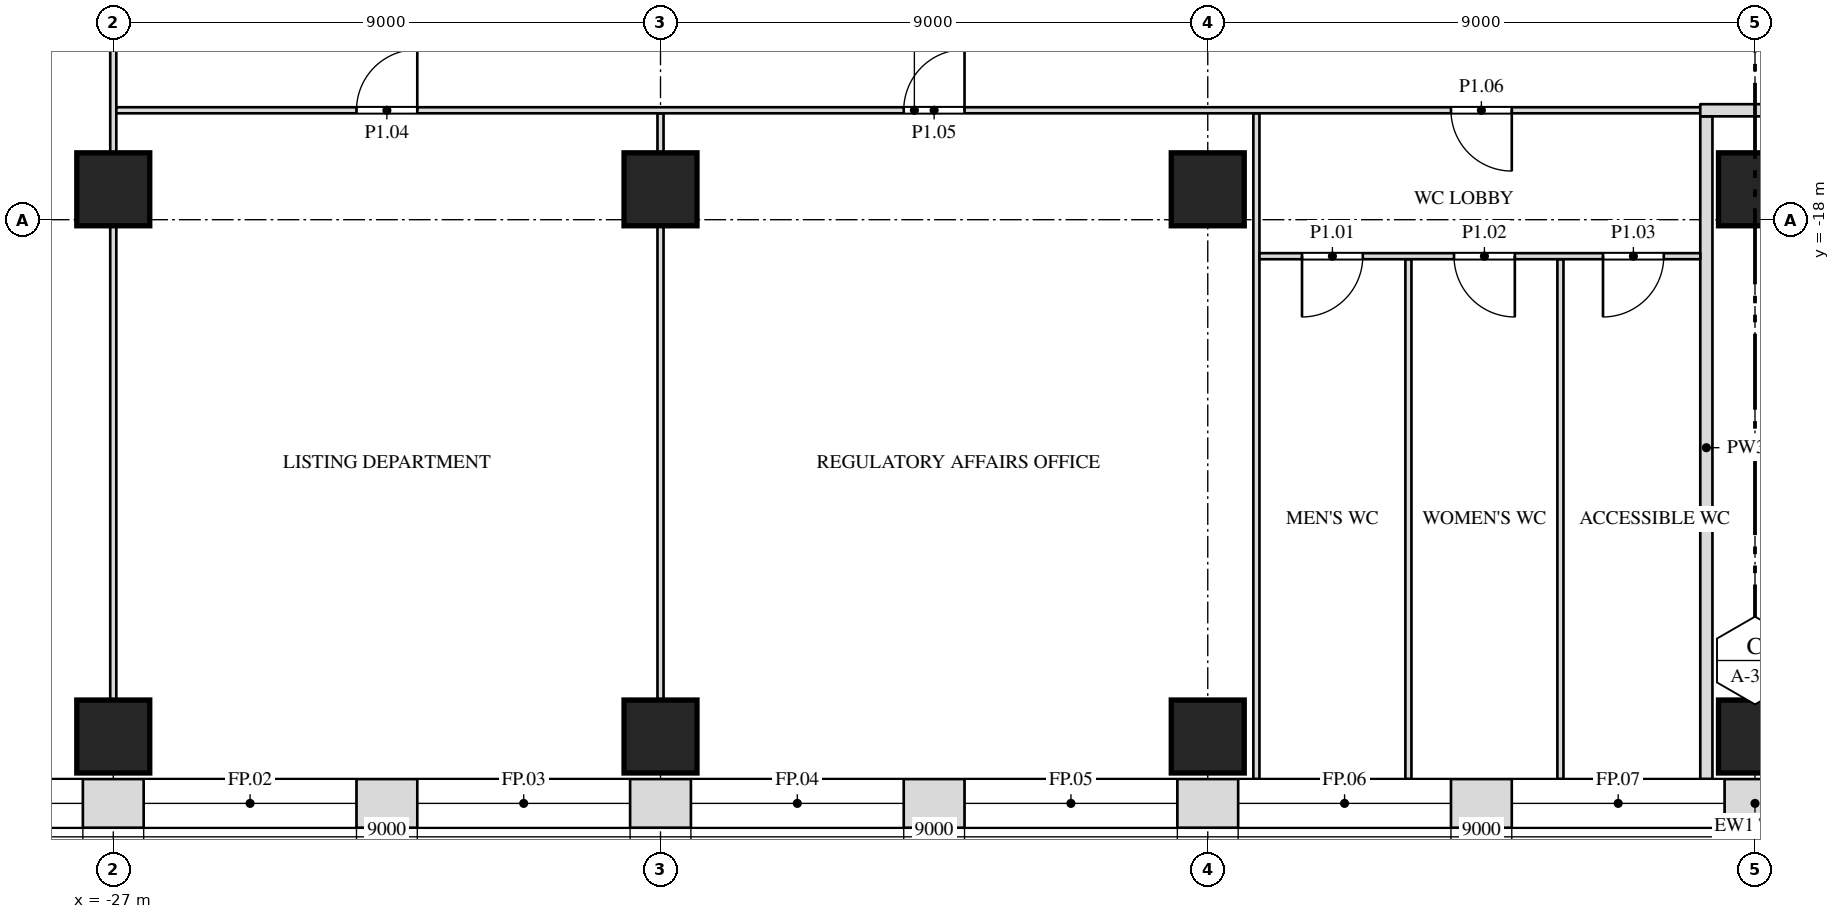
"""IFC4 building model, lengths in metres.
Left out: names, types, materials, properties, quantities, classifications, styles, units other than length and angle.
Written with IfcOpenShell. Run it as: python <this file> out.ifc"""

import sys

from ifc_helpers import new_model, si_unit, direction, frame, frame_2d, origin, origin_2d, place, context, subcontext, project, spatial, rectangle, extrude, element, fill, save


model = new_model("IFC4")
c1 = context("Model", 3, precision=1e-05, world=origin(), true_north=direction((0.0, 1.0)))
c2 = subcontext(c1, "Body", "Model", "MODEL_VIEW")
j1 = project(units=[si_unit("LENGTHUNIT", "METRE"), si_unit("PLANEANGLEUNIT", "RADIAN")], contexts=[c1])
p1 = place(None, origin())
s1 = spatial("IfcSite", under=j1, at=p1, CompositionType="ELEMENT")
p2 = place(p1, origin())
s2 = spatial("IfcBuilding", under=s1, at=p2, CompositionType="ELEMENT")
p3 = place(p2, frame((0.0, 0.0, 9.0)))
s3 = spatial("IfcBuildingStorey", under=s2, at=p3, CompositionType="ELEMENT", Elevation=9.0)
for number, where, z_axis, x_axis in (
    (1, (-27.0, -26.5, 0.0), (0.0, 0.0, 1.0), (1.0, 0.0, 0.0)),
    (2, (-18.0, -26.5, 0.0), (0.0, 0.0, 1.0), (1.0, 0.0, 0.0)),
    (3, (-9.0, -26.5, 0.0), (0.0, 0.0, 1.0), (1.0, 0.0, 0.0)),
    (4, (0.0, -26.5, 0.0), (0.0, 0.0, 1.0), (1.0, 0.0, 0.0)),
    (5, (-27.0, -17.5, 0.0), (0.0, 0.0, 1.0), (1.0, 0.0, 0.0)),
    (6, (-18.0, -17.5, 0.0), (0.0, 0.0, 1.0), (1.0, 0.0, 0.0)),
    (7, (-9.0, -17.5, 0.0), (0.0, 0.0, 1.0), (1.0, 0.0, 0.0)),
    (8, (0.0, -17.5, 0.0), (0.0, 0.0, 1.0), (1.0, 0.0, 0.0)),
):
    element("IfcColumn", number, at=place(p3, frame(where, z_axis=z_axis, x_axis=x_axis)), inside=s3, PredefinedType="COLUMN", context=c2, shape_type="SweptSolid", body=[
        extrude(rectangle(XDim=1.2, YDim=1.2, at=origin_2d()), origin(), (0.0, 0.0, 1.0), 6.0),
    ])
p4 = place(p3, frame((-27.0, -25.9, 0.0), z_axis=(0.0, 0.0, 1.0), x_axis=(0.0, 1.0, 0.0)))
e9 = element("IfcWall", 9, at=p4, inside=s3, PredefinedType="PARTITIONING", context=c2, shape_type="SweptSolid", body=[
    extrude(rectangle(XDim=7.8, YDim=0.1, at=frame_2d((3.9, 0.0))), origin(), (0.0, 0.0, 1.0), 5.088),
])
p5 = place(p3, frame((-27.0, -16.9, 0.0), z_axis=(0.0, 0.0, 1.0), x_axis=(0.0, 1.0, 0.0)))
e10 = element("IfcWall", 10, at=p5, inside=s3, PredefinedType="PARTITIONING", context=c2, shape_type="SweptSolid", body=[
    extrude(rectangle(XDim=2.85, YDim=0.1, at=frame_2d((1.425, 0.0))), origin(), (0.0, 0.0, 1.0), 5.088),
])
p6 = place(p3, frame((-18.0, -25.9, 0.0), z_axis=(0.0, 0.0, 1.0), x_axis=(0.0, 1.0, 0.0)))
e11 = element("IfcWall", 11, at=p6, inside=s3, PredefinedType="PARTITIONING", context=c2, shape_type="SweptSolid", body=[
    extrude(rectangle(XDim=7.8, YDim=0.1, at=frame_2d((3.9, 0.0))), origin(), (0.0, 0.0, 1.0), 5.088),
])
p7 = place(p3, frame((-18.0, -16.9, 0.0), z_axis=(0.0, 0.0, 1.0), x_axis=(0.0, 1.0, 0.0)))
e12 = element("IfcWall", 12, at=p7, inside=s3, PredefinedType="PARTITIONING", context=c2, shape_type="SweptSolid", body=[
    extrude(rectangle(XDim=0.65, YDim=0.1, at=frame_2d((0.325, 0.0))), origin(), (0.0, 0.0, 1.0), 5.7),
])
p8 = place(p3, frame((-8.2, -27.2, 0.0), z_axis=(0.0, 0.0, 1.0), x_axis=(0.0, 1.0, 0.0)))
e13 = element("IfcWall", 13, at=p8, inside=s3, PredefinedType="PARTITIONING", context=c2, shape_type="SweptSolid", body=[
    extrude(rectangle(XDim=10.95, YDim=0.1, at=frame_2d((5.475, 0.0))), origin(), (0.0, 0.0, 1.0), 5.7),
])
for number, where, z_axis, x_axis in (
    (14, (-5.7, -27.2, 0.0), (0.0, 0.0, 1.0), (0.0, 1.0, 0.0)),
    (15, (-3.2, -27.2, 0.0), (0.0, 0.0, 1.0), (0.0, 1.0, 0.0)),
):
    element("IfcWall", number, at=place(p3, frame(where, z_axis=z_axis, x_axis=x_axis)), inside=s3, PredefinedType="PARTITIONING", context=c2, shape_type="SweptSolid", body=[
        extrude(rectangle(XDim=8.55, YDim=0.1, at=frame_2d((4.275, 0.0))), origin(), (0.0, 0.0, 1.0), 5.7),
    ])
p9 = place(p3, frame((-0.8, -27.2, 0.0), z_axis=(0.0, 0.0, 1.0), x_axis=(0.0, 1.0, 0.0)))
e16 = element("IfcWall", 16, at=p9, inside=s3, PredefinedType="PARTITIONING", context=c2, shape_type="SweptSolid", body=[
    extrude(rectangle(XDim=10.9, YDim=0.2, at=frame_2d((5.45, 0.0))), origin(), (0.0, 0.0, 1.0), 5.7),
])
p10 = place(p3, frame((-8.15, -18.6, 0.0), z_axis=(0.0, 0.0, 1.0), x_axis=(1.0, 0.0, 0.0)))
e17 = element("IfcWall", 17, at=p10, inside=s3, PredefinedType="PARTITIONING", context=c2, shape_type="SweptSolid", body=[
    extrude(rectangle(XDim=7.25, YDim=0.1, at=frame_2d((3.625, 0.0))), origin(), (0.0, 0.0, 1.0), 5.7),
])
p11 = place(p10, frame((0.7, 0.0, 0.0)))
e18 = element("IfcOpeningElement", 18, at=p11, cuts=e17, PredefinedType="OPENING", context=c2, shape_type="SweptSolid", body=[
    extrude(rectangle(XDim=1.0, YDim=2.1, at=frame_2d((0.5, 1.05))), frame((0.0, 0.062, 0.0), z_axis=(0.0, -1.0, 0.0), x_axis=(1.0, 0.0, 0.0)), (0.0, 0.0, 1.0), 0.124),
])
p12 = place(p10, frame((3.2, 0.0, 0.0)))
e19 = element("IfcOpeningElement", 19, at=p12, cuts=e17, PredefinedType="OPENING", context=c2, shape_type="SweptSolid", body=[
    extrude(rectangle(XDim=1.0, YDim=2.1, at=frame_2d((0.5, 1.05))), frame((0.0, 0.062, 0.0), z_axis=(0.0, -1.0, 0.0), x_axis=(1.0, 0.0, 0.0)), (0.0, 0.0, 1.0), 0.124),
])
p13 = place(p10, frame((5.65, 0.0, 0.0)))
e20 = element("IfcOpeningElement", 20, at=p13, cuts=e17, PredefinedType="OPENING", context=c2, shape_type="SweptSolid", body=[
    extrude(rectangle(XDim=1.0, YDim=2.1, at=frame_2d((0.5, 1.05))), frame((0.0, 0.062, 0.0), z_axis=(0.0, -1.0, 0.0), x_axis=(1.0, 0.0, 0.0)), (0.0, 0.0, 1.0), 0.124),
])
p14 = place(p3, frame((-26.95, -16.2, 0.0), z_axis=(0.0, 0.0, 1.0), x_axis=(1.0, 0.0, 0.0)))
e21 = element("IfcWall", 21, at=p14, inside=s3, PredefinedType="PARTITIONING", context=c2, shape_type="SweptSolid", body=[
    extrude(rectangle(XDim=26.25, YDim=0.1, at=frame_2d((13.125, 0.0))), origin(), (0.0, 0.0, 1.0), 5.7),
])
p15 = place(p14, frame((3.95, 0.0, 0.0)))
e22 = element("IfcOpeningElement", 22, at=p15, cuts=e21, PredefinedType="OPENING", context=c2, shape_type="SweptSolid", body=[
    extrude(rectangle(XDim=1.0, YDim=2.1, at=frame_2d((0.5, 1.05))), frame((0.0, 0.062, 0.0), z_axis=(0.0, -1.0, 0.0), x_axis=(1.0, 0.0, 0.0)), (0.0, 0.0, 1.0), 0.124),
])
p16 = place(p14, frame((12.95, 0.0, 0.0)))
e23 = element("IfcOpeningElement", 23, at=p16, cuts=e21, PredefinedType="OPENING", context=c2, shape_type="SweptSolid", body=[
    extrude(rectangle(XDim=1.0, YDim=2.1, at=frame_2d((0.5, 1.05))), frame((0.0, 0.062, 0.0), z_axis=(0.0, -1.0, 0.0), x_axis=(1.0, 0.0, 0.0)), (0.0, 0.0, 1.0), 0.124),
])
p17 = place(p14, frame((21.95, 0.0, 0.0)))
e24 = element("IfcOpeningElement", 24, at=p17, cuts=e21, PredefinedType="OPENING", context=c2, shape_type="SweptSolid", body=[
    extrude(rectangle(XDim=1.0, YDim=2.1, at=frame_2d((0.5, 1.05))), frame((0.0, 0.062, 0.0), z_axis=(0.0, -1.0, 0.0), x_axis=(1.0, 0.0, 0.0)), (0.0, 0.0, 1.0), 0.124),
])
p18 = place(p3, frame((-0.9, -16.2, 0.0), z_axis=(0.0, 0.0, 1.0), x_axis=(1.0, 0.0, 0.0)))
e25 = element("IfcWall", 25, at=p18, inside=s3, PredefinedType="PARTITIONING", context=c2, shape_type="SweptSolid", body=[
    extrude(rectangle(XDim=9.975, YDim=0.2, at=frame_2d((4.987, 0.0))), origin(), (0.0, 0.0, 1.0), 5.7),
])
p19 = place(p18, frame((4.9, 0.0, 0.0)))
e26 = element("IfcOpeningElement", 26, at=p19, cuts=e25, PredefinedType="OPENING", context=c2, shape_type="SweptSolid", body=[
    extrude(rectangle(XDim=1.0, YDim=2.1, at=frame_2d((0.5, 1.05))), frame((0.0, 0.112, 0.0), z_axis=(0.0, -1.0, 0.0), x_axis=(1.0, 0.0, 0.0)), (0.0, 0.0, 1.0), 0.224),
])
p20 = place(p3, frame((-32.948, -27.6, 0.0), z_axis=(0.0, 0.0, 1.0), x_axis=(1.0, 0.0, 0.0)))
e27 = element("IfcWall", 27, at=p20, inside=s3, PredefinedType="SOLIDWALL", context=c2, shape_type="SweptSolid", body=[
    extrude(rectangle(XDim=65.895, YDim=0.8, at=frame_2d((32.948, 0.0))), origin(), (0.0, 0.0, 1.0), 5.7),
])
p21 = place(p20, frame((1.948, 0.0, 1.0)))
e28 = element("IfcOpeningElement", 28, at=p21, cuts=e27, PredefinedType="OPENING", context=c2, shape_type="SweptSolid", body=[
    extrude(rectangle(XDim=3.5, YDim=4.0, at=frame_2d((1.75, 2.0))), frame((0.0, 0.412, 0.0), z_axis=(0.0, -1.0, 0.0), x_axis=(1.0, 0.0, 0.0)), (0.0, 0.0, 1.0), 0.824),
])
p22 = place(p20, frame((6.448, 0.0, 1.0)))
e29 = element("IfcOpeningElement", 29, at=p22, cuts=e27, PredefinedType="OPENING", context=c2, shape_type="SweptSolid", body=[
    extrude(rectangle(XDim=3.5, YDim=4.0, at=frame_2d((1.75, 2.0))), frame((0.0, 0.412, 0.0), z_axis=(0.0, -1.0, 0.0), x_axis=(1.0, 0.0, 0.0)), (0.0, 0.0, 1.0), 0.824),
])
p23 = place(p20, frame((10.948, 0.0, 1.0)))
e30 = element("IfcOpeningElement", 30, at=p23, cuts=e27, PredefinedType="OPENING", context=c2, shape_type="SweptSolid", body=[
    extrude(rectangle(XDim=3.5, YDim=4.0, at=frame_2d((1.75, 2.0))), frame((0.0, 0.412, 0.0), z_axis=(0.0, -1.0, 0.0), x_axis=(1.0, 0.0, 0.0)), (0.0, 0.0, 1.0), 0.824),
])
p24 = place(p20, frame((15.448, 0.0, 1.0)))
e31 = element("IfcOpeningElement", 31, at=p24, cuts=e27, PredefinedType="OPENING", context=c2, shape_type="SweptSolid", body=[
    extrude(rectangle(XDim=3.5, YDim=4.0, at=frame_2d((1.75, 2.0))), frame((0.0, 0.412, 0.0), z_axis=(0.0, -1.0, 0.0), x_axis=(1.0, 0.0, 0.0)), (0.0, 0.0, 1.0), 0.824),
])
p25 = place(p20, frame((19.948, 0.0, 1.0)))
e32 = element("IfcOpeningElement", 32, at=p25, cuts=e27, PredefinedType="OPENING", context=c2, shape_type="SweptSolid", body=[
    extrude(rectangle(XDim=3.5, YDim=4.0, at=frame_2d((1.75, 2.0))), frame((0.0, 0.412, 0.0), z_axis=(0.0, -1.0, 0.0), x_axis=(1.0, 0.0, 0.0)), (0.0, 0.0, 1.0), 0.824),
])
p26 = place(p20, frame((24.448, 0.0, 1.0)))
e33 = element("IfcOpeningElement", 33, at=p26, cuts=e27, PredefinedType="OPENING", context=c2, shape_type="SweptSolid", body=[
    extrude(rectangle(XDim=3.5, YDim=4.0, at=frame_2d((1.75, 2.0))), frame((0.0, 0.412, 0.0), z_axis=(0.0, -1.0, 0.0), x_axis=(1.0, 0.0, 0.0)), (0.0, 0.0, 1.0), 0.824),
])
p27 = place(p20, frame((28.948, 0.0, 1.0)))
e34 = element("IfcOpeningElement", 34, at=p27, cuts=e27, PredefinedType="OPENING", context=c2, shape_type="SweptSolid", body=[
    extrude(rectangle(XDim=3.5, YDim=4.0, at=frame_2d((1.75, 2.0))), frame((0.0, 0.412, 0.0), z_axis=(0.0, -1.0, 0.0), x_axis=(1.0, 0.0, 0.0)), (0.0, 0.0, 1.0), 0.824),
])
p28 = place(p20, frame((33.448, 0.0, 1.0)))
e35 = element("IfcOpeningElement", 35, at=p28, cuts=e27, PredefinedType="OPENING", context=c2, shape_type="SweptSolid", body=[
    extrude(rectangle(XDim=3.5, YDim=4.0, at=frame_2d((1.75, 2.0))), frame((0.0, 0.412, 0.0), z_axis=(0.0, -1.0, 0.0), x_axis=(1.0, 0.0, 0.0)), (0.0, 0.0, 1.0), 0.824),
])
p29 = place(p20, frame((37.948, 0.0, 1.0)))
e36 = element("IfcOpeningElement", 36, at=p29, cuts=e27, PredefinedType="OPENING", context=c2, shape_type="SweptSolid", body=[
    extrude(rectangle(XDim=3.5, YDim=4.0, at=frame_2d((1.75, 2.0))), frame((0.0, 0.412, 0.0), z_axis=(0.0, -1.0, 0.0), x_axis=(1.0, 0.0, 0.0)), (0.0, 0.0, 1.0), 0.824),
])
p30 = place(p20, frame((42.448, 0.0, 1.0)))
e37 = element("IfcOpeningElement", 37, at=p30, cuts=e27, PredefinedType="OPENING", context=c2, shape_type="SweptSolid", body=[
    extrude(rectangle(XDim=3.5, YDim=4.0, at=frame_2d((1.75, 2.0))), frame((0.0, 0.412, 0.0), z_axis=(0.0, -1.0, 0.0), x_axis=(1.0, 0.0, 0.0)), (0.0, 0.0, 1.0), 0.824),
])
p31 = place(p20, frame((46.948, 0.0, 1.0)))
e38 = element("IfcOpeningElement", 38, at=p31, cuts=e27, PredefinedType="OPENING", context=c2, shape_type="SweptSolid", body=[
    extrude(rectangle(XDim=3.5, YDim=4.0, at=frame_2d((1.75, 2.0))), frame((0.0, 0.412, 0.0), z_axis=(0.0, -1.0, 0.0), x_axis=(1.0, 0.0, 0.0)), (0.0, 0.0, 1.0), 0.824),
])
p32 = place(p20, frame((51.448, 0.0, 1.0)))
e39 = element("IfcOpeningElement", 39, at=p32, cuts=e27, PredefinedType="OPENING", context=c2, shape_type="SweptSolid", body=[
    extrude(rectangle(XDim=3.5, YDim=4.0, at=frame_2d((1.75, 2.0))), frame((0.0, 0.412, 0.0), z_axis=(0.0, -1.0, 0.0), x_axis=(1.0, 0.0, 0.0)), (0.0, 0.0, 1.0), 0.824),
])
p33 = place(p20, frame((55.948, 0.0, 1.0)))
e40 = element("IfcOpeningElement", 40, at=p33, cuts=e27, PredefinedType="OPENING", context=c2, shape_type="SweptSolid", body=[
    extrude(rectangle(XDim=3.5, YDim=4.0, at=frame_2d((1.75, 2.0))), frame((0.0, 0.412, 0.0), z_axis=(0.0, -1.0, 0.0), x_axis=(1.0, 0.0, 0.0)), (0.0, 0.0, 1.0), 0.824),
])
p34 = place(p20, frame((60.448, 0.0, 1.0)))
e41 = element("IfcOpeningElement", 41, at=p34, cuts=e27, PredefinedType="OPENING", context=c2, shape_type="SweptSolid", body=[
    extrude(rectangle(XDim=3.5, YDim=4.0, at=frame_2d((1.75, 2.0))), frame((0.0, 0.412, 0.0), z_axis=(0.0, -1.0, 0.0), x_axis=(1.0, 0.0, 0.0)), (0.0, 0.0, 1.0), 0.824),
])
p35 = place(p11, origin())
e42 = element("IfcDoor", 42, at=p35, inside=s3, OperationType="SINGLE_SWING_RIGHT", PredefinedType="DOOR", context=c2, shape_type="SweptSolid", body=[
    extrude(rectangle(XDim=1.0, YDim=2.1, at=frame_2d((0.5, 1.05))), frame((0.0, 0.025, 0.0), z_axis=(0.0, -1.0, 0.0), x_axis=(1.0, 0.0, 0.0)), (0.0, 0.0, 1.0), 0.05),
])
fill(e18, e42)
p36 = place(p12, origin())
e43 = element("IfcDoor", 43, at=p36, inside=s3, OperationType="SINGLE_SWING_LEFT", PredefinedType="DOOR", context=c2, shape_type="SweptSolid", body=[
    extrude(rectangle(XDim=1.0, YDim=2.1, at=frame_2d((0.5, 1.05))), frame((0.0, 0.025, 0.0), z_axis=(0.0, -1.0, 0.0), x_axis=(1.0, 0.0, 0.0)), (0.0, 0.0, 1.0), 0.05),
])
fill(e19, e43)
p37 = place(p13, origin())
e44 = element("IfcDoor", 44, at=p37, inside=s3, OperationType="SINGLE_SWING_RIGHT", PredefinedType="DOOR", context=c2, shape_type="SweptSolid", body=[
    extrude(rectangle(XDim=1.0, YDim=2.1, at=frame_2d((0.5, 1.05))), frame((0.0, 0.025, 0.0), z_axis=(0.0, -1.0, 0.0), x_axis=(1.0, 0.0, 0.0)), (0.0, 0.0, 1.0), 0.05),
])
fill(e20, e44)
p38 = place(p15, origin())
e45 = element("IfcDoor", 45, at=p38, inside=s3, OperationType="SINGLE_SWING_RIGHT", PredefinedType="DOOR", context=c2, shape_type="SweptSolid", body=[
    extrude(rectangle(XDim=1.0, YDim=2.1, at=frame_2d((0.5, 1.05))), frame((0.0, 0.025, 0.0), z_axis=(0.0, -1.0, 0.0), x_axis=(1.0, 0.0, 0.0)), (0.0, 0.0, 1.0), 0.05),
])
fill(e22, e45)
p39 = place(p16, origin())
e46 = element("IfcDoor", 46, at=p39, inside=s3, OperationType="SINGLE_SWING_RIGHT", PredefinedType="DOOR", context=c2, shape_type="SweptSolid", body=[
    extrude(rectangle(XDim=1.0, YDim=2.1, at=frame_2d((0.5, 1.05))), frame((0.0, 0.025, 0.0), z_axis=(0.0, -1.0, 0.0), x_axis=(1.0, 0.0, 0.0)), (0.0, 0.0, 1.0), 0.05),
])
fill(e23, e46)
p40 = place(p17, origin())
e47 = element("IfcDoor", 47, at=p40, inside=s3, OperationType="SINGLE_SWING_LEFT", PredefinedType="DOOR", context=c2, shape_type="SweptSolid", body=[
    extrude(rectangle(XDim=1.0, YDim=2.1, at=frame_2d((0.5, 1.05))), frame((0.0, 0.025, 0.0), z_axis=(0.0, -1.0, 0.0), x_axis=(1.0, 0.0, 0.0)), (0.0, 0.0, 1.0), 0.05),
])
fill(e24, e47)
p41 = place(p21, origin())
e48 = element("IfcWindow", 48, at=p41, inside=s3, PartitioningType="SINGLE_PANEL", PredefinedType="WINDOW", context=c2, shape_type="SweptSolid", body=[
    extrude(rectangle(XDim=3.5, YDim=4.0, at=frame_2d((1.75, 2.0))), frame((0.0, 0.03, 0.0), z_axis=(0.0, -1.0, 0.0), x_axis=(1.0, 0.0, 0.0)), (0.0, 0.0, 1.0), 0.06),
])
fill(e28, e48)
p42 = place(p22, origin())
e49 = element("IfcWindow", 49, at=p42, inside=s3, PartitioningType="SINGLE_PANEL", PredefinedType="WINDOW", context=c2, shape_type="SweptSolid", body=[
    extrude(rectangle(XDim=3.5, YDim=4.0, at=frame_2d((1.75, 2.0))), frame((0.0, 0.03, 0.0), z_axis=(0.0, -1.0, 0.0), x_axis=(1.0, 0.0, 0.0)), (0.0, 0.0, 1.0), 0.06),
])
fill(e29, e49)
p43 = place(p23, origin())
e50 = element("IfcWindow", 50, at=p43, inside=s3, PartitioningType="SINGLE_PANEL", PredefinedType="WINDOW", context=c2, shape_type="SweptSolid", body=[
    extrude(rectangle(XDim=3.5, YDim=4.0, at=frame_2d((1.75, 2.0))), frame((0.0, 0.03, 0.0), z_axis=(0.0, -1.0, 0.0), x_axis=(1.0, 0.0, 0.0)), (0.0, 0.0, 1.0), 0.06),
])
fill(e30, e50)
p44 = place(p24, origin())
e51 = element("IfcWindow", 51, at=p44, inside=s3, PartitioningType="SINGLE_PANEL", PredefinedType="WINDOW", context=c2, shape_type="SweptSolid", body=[
    extrude(rectangle(XDim=3.5, YDim=4.0, at=frame_2d((1.75, 2.0))), frame((0.0, 0.03, 0.0), z_axis=(0.0, -1.0, 0.0), x_axis=(1.0, 0.0, 0.0)), (0.0, 0.0, 1.0), 0.06),
])
fill(e31, e51)
p45 = place(p25, origin())
e52 = element("IfcWindow", 52, at=p45, inside=s3, PartitioningType="SINGLE_PANEL", PredefinedType="WINDOW", context=c2, shape_type="SweptSolid", body=[
    extrude(rectangle(XDim=3.5, YDim=4.0, at=frame_2d((1.75, 2.0))), frame((0.0, 0.03, 0.0), z_axis=(0.0, -1.0, 0.0), x_axis=(1.0, 0.0, 0.0)), (0.0, 0.0, 1.0), 0.06),
])
fill(e32, e52)
p46 = place(p26, origin())
e53 = element("IfcWindow", 53, at=p46, inside=s3, PartitioningType="SINGLE_PANEL", PredefinedType="WINDOW", context=c2, shape_type="SweptSolid", body=[
    extrude(rectangle(XDim=3.5, YDim=4.0, at=frame_2d((1.75, 2.0))), frame((0.0, 0.03, 0.0), z_axis=(0.0, -1.0, 0.0), x_axis=(1.0, 0.0, 0.0)), (0.0, 0.0, 1.0), 0.06),
])
fill(e33, e53)
p47 = place(p27, origin())
e54 = element("IfcWindow", 54, at=p47, inside=s3, PartitioningType="SINGLE_PANEL", PredefinedType="WINDOW", context=c2, shape_type="SweptSolid", body=[
    extrude(rectangle(XDim=3.5, YDim=4.0, at=frame_2d((1.75, 2.0))), frame((0.0, 0.03, 0.0), z_axis=(0.0, -1.0, 0.0), x_axis=(1.0, 0.0, 0.0)), (0.0, 0.0, 1.0), 0.06),
])
fill(e34, e54)
save(model, sys.argv[1])
